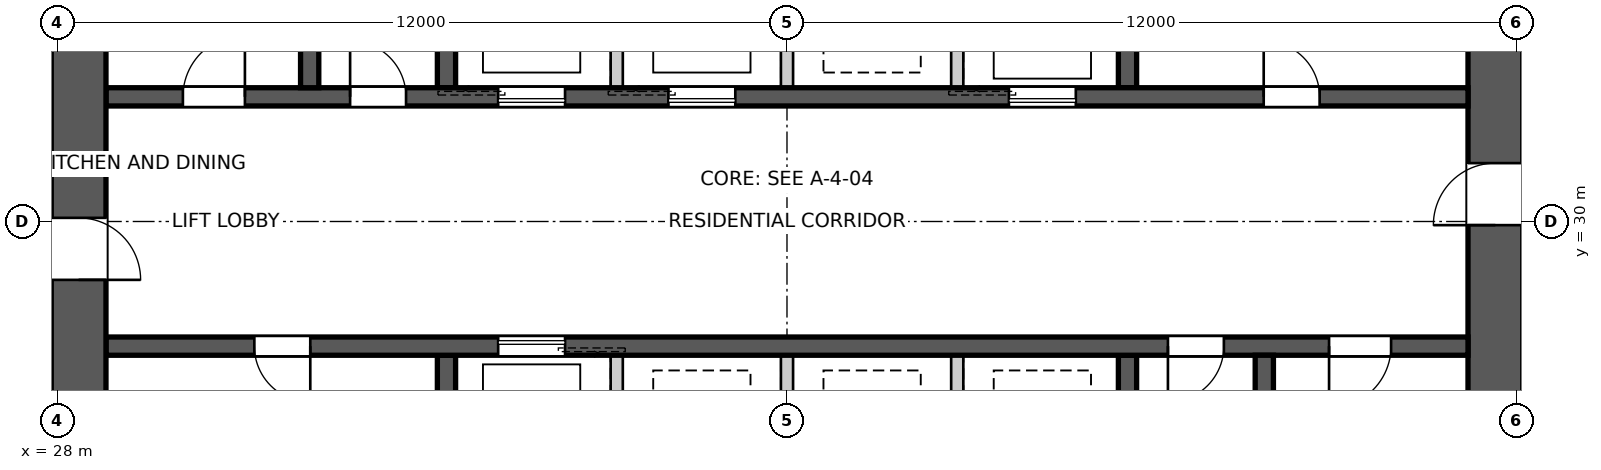
"""IFC4 building model, lengths in metres.
Left out: names, types, materials, properties, quantities, classifications, styles, units other than length and angle.
Written with IfcOpenShell. Run it as: python <this file> out.ifc"""

import sys

from ifc_helpers import new_model, si_unit, direction, frame, frame_2d, origin, place, context, subcontext, project, spatial, polyline, rectangle, outline, extrude, element, fill, save


model = new_model("IFC4")
c1 = context("Model", 3, precision=1e-05, world=origin(), true_north=direction((0.0, 1.0)))
c2 = subcontext(c1, "Body", "Model", "MODEL_VIEW")
j1 = project(units=[si_unit("LENGTHUNIT", "METRE"), si_unit("PLANEANGLEUNIT", "RADIAN")], contexts=[c1])
p1 = place(None, origin())
s1 = spatial("IfcSite", under=j1, at=p1, CompositionType="ELEMENT")
p2 = place(p1, origin())
s2 = spatial("IfcBuilding", under=s1, at=p2, CompositionType="ELEMENT")
p3 = place(p2, frame((0.0, 0.0, 25.2)))
s3 = spatial("IfcBuildingStorey", under=s2, at=p3, CompositionType="ELEMENT", Elevation=25.2)
p4 = place(p3, frame((51.65, 18.8, 0.0), z_axis=(0.0, 0.0, 1.0), x_axis=(0.0, 1.0, 0.0)))
e1 = element("IfcWall", 1, at=p4, inside=s3, PredefinedType="SHEAR", context=c2, shape_type="SweptSolid", body=[
    extrude(outline(polyline([(0.0, -0.45), (22.4, -0.45), (22.4, -0.025), (22.85, -0.025), (22.85, 0.025), (22.4, 0.025), (22.4, 0.45), (0.0, 0.45), (0.0, 0.025), (-0.45, 0.025), (-0.45, -0.025), (0.0, -0.025), (0.0, -0.45)])), origin(), (0.0, 0.0, 1.0), 3.4),
])
p5 = place(p4, frame((11.14, 0.0, 0.0)))
e2 = element("IfcOpeningElement", 2, at=p5, cuts=e1, PredefinedType="OPENING", context=c2, shape_type="SweptSolid", body=[
    extrude(rectangle(XDim=1.02, YDim=2.4, at=frame_2d((0.51, 1.2))), frame((0.0, 0.46, 0.0), z_axis=(0.0, -1.0, 0.0), x_axis=(1.0, 0.0, 0.0)), (0.0, 0.0, 1.0), 0.92),
])
p6 = place(p3, frame((28.35, 41.2, 0.0), z_axis=(0.0, 0.0, 1.0), x_axis=(0.0, -1.0, 0.0)))
e3 = element("IfcWall", 3, at=p6, inside=s3, PredefinedType="SHEAR", context=c2, shape_type="SweptSolid", body=[
    extrude(outline(polyline([(0.0, -0.45), (22.4, -0.45), (22.4, -0.025), (22.85, -0.025), (22.85, 0.025), (22.4, 0.025), (22.4, 0.45), (0.0, 0.45), (0.0, 0.025), (-0.45, 0.025), (-0.45, -0.025), (0.0, -0.025), (0.0, -0.45)])), origin(), (0.0, 0.0, 1.0), 3.4),
])
p7 = place(p6, frame((11.14, 0.0, 0.0)))
e4 = element("IfcOpeningElement", 4, at=p7, cuts=e3, PredefinedType="OPENING", context=c2, shape_type="SweptSolid", body=[
    extrude(rectangle(XDim=1.02, YDim=2.4, at=frame_2d((0.51, 1.2))), frame((0.0, 0.46, 0.0), z_axis=(0.0, -1.0, 0.0), x_axis=(1.0, 0.0, 0.0)), (0.0, 0.0, 1.0), 0.92),
])
p8 = place(p3, frame((28.8, 32.05, 0.0), z_axis=(0.0, 0.0, 1.0), x_axis=(1.0, 0.0, 0.0)))
e5 = element("IfcWall", 5, at=p8, inside=s3, PredefinedType="SHEAR", context=c2, shape_type="SweptSolid", body=[
    extrude(rectangle(XDim=22.4, YDim=0.3, at=frame_2d((11.2, 0.0))), origin(), (0.0, 0.0, 1.0), 3.4),
])
p9 = place(p8, frame((19.04, 0.0, 0.0)))
e6 = element("IfcOpeningElement", 6, at=p9, cuts=e5, PredefinedType="OPENING", context=c2, shape_type="SweptSolid", body=[
    extrude(rectangle(XDim=0.92, YDim=2.1, at=frame_2d((0.46, 1.05))), frame((0.0, 0.16, 0.0), z_axis=(0.0, -1.0, 0.0), x_axis=(1.0, 0.0, 0.0)), (0.0, 0.0, 1.0), 0.32),
])
p10 = place(p8, frame((1.265, 0.0, 0.0)))
e7 = element("IfcOpeningElement", 7, at=p10, cuts=e5, PredefinedType="OPENING", context=c2, shape_type="SweptSolid", body=[
    extrude(rectangle(XDim=1.02, YDim=2.1, at=frame_2d((0.51, 1.05))), frame((0.0, 0.16, 0.0), z_axis=(0.0, -1.0, 0.0), x_axis=(1.0, 0.0, 0.0)), (0.0, 0.0, 1.0), 0.32),
])
p11 = place(p8, frame((4.015, 0.0, 0.0)))
e8 = element("IfcOpeningElement", 8, at=p11, cuts=e5, PredefinedType="OPENING", context=c2, shape_type="SweptSolid", body=[
    extrude(rectangle(XDim=0.92, YDim=2.1, at=frame_2d((0.46, 1.05))), frame((0.0, 0.16, 0.0), z_axis=(0.0, -1.0, 0.0), x_axis=(1.0, 0.0, 0.0)), (0.0, 0.0, 1.0), 0.32),
])
p12 = place(p8, frame((6.45, 0.0, 0.0)))
e9 = element("IfcOpeningElement", 9, at=p12, cuts=e5, PredefinedType="OPENING", context=c2, shape_type="SweptSolid", body=[
    extrude(rectangle(XDim=1.1, YDim=2.1, at=frame_2d((0.55, 1.05))), frame((0.0, 0.16, 0.0), z_axis=(0.0, -1.0, 0.0), x_axis=(1.0, 0.0, 0.0)), (0.0, 0.0, 1.0), 0.32),
])
p13 = place(p8, frame((9.25, 0.0, 0.0)))
e10 = element("IfcOpeningElement", 10, at=p13, cuts=e5, PredefinedType="OPENING", context=c2, shape_type="SweptSolid", body=[
    extrude(rectangle(XDim=1.1, YDim=2.1, at=frame_2d((0.55, 1.05))), frame((0.0, 0.16, 0.0), z_axis=(0.0, -1.0, 0.0), x_axis=(1.0, 0.0, 0.0)), (0.0, 0.0, 1.0), 0.32),
])
p14 = place(p8, frame((14.85, 0.0, 0.0)))
e11 = element("IfcOpeningElement", 11, at=p14, cuts=e5, PredefinedType="OPENING", context=c2, shape_type="SweptSolid", body=[
    extrude(rectangle(XDim=1.1, YDim=2.1, at=frame_2d((0.55, 1.05))), frame((0.0, 0.16, 0.0), z_axis=(0.0, -1.0, 0.0), x_axis=(1.0, 0.0, 0.0)), (0.0, 0.0, 1.0), 0.32),
])
p15 = place(p3, frame((51.2, 27.95, 0.0), z_axis=(0.0, 0.0, 1.0), x_axis=(-1.0, 0.0, 0.0)))
e12 = element("IfcWall", 12, at=p15, inside=s3, PredefinedType="SHEAR", context=c2, shape_type="SweptSolid", body=[
    extrude(rectangle(XDim=22.4, YDim=0.3, at=frame_2d((11.2, 0.0))), origin(), (0.0, 0.0, 1.0), 3.4),
])
p16 = place(p15, frame((19.04, 0.0, 0.0)))
e13 = element("IfcOpeningElement", 13, at=p16, cuts=e12, PredefinedType="OPENING", context=c2, shape_type="SweptSolid", body=[
    extrude(rectangle(XDim=0.92, YDim=2.1, at=frame_2d((0.46, 1.05))), frame((0.0, 0.16, 0.0), z_axis=(0.0, -1.0, 0.0), x_axis=(1.0, 0.0, 0.0)), (0.0, 0.0, 1.0), 0.32),
])
p17 = place(p15, frame((1.265, 0.0, 0.0)))
e14 = element("IfcOpeningElement", 14, at=p17, cuts=e12, PredefinedType="OPENING", context=c2, shape_type="SweptSolid", body=[
    extrude(rectangle(XDim=1.02, YDim=2.1, at=frame_2d((0.51, 1.05))), frame((0.0, 0.16, 0.0), z_axis=(0.0, -1.0, 0.0), x_axis=(1.0, 0.0, 0.0)), (0.0, 0.0, 1.0), 0.32),
])
p18 = place(p15, frame((4.015, 0.0, 0.0)))
e15 = element("IfcOpeningElement", 15, at=p18, cuts=e12, PredefinedType="OPENING", context=c2, shape_type="SweptSolid", body=[
    extrude(rectangle(XDim=0.92, YDim=2.1, at=frame_2d((0.46, 1.05))), frame((0.0, 0.16, 0.0), z_axis=(0.0, -1.0, 0.0), x_axis=(1.0, 0.0, 0.0)), (0.0, 0.0, 1.0), 0.32),
])
p19 = place(p15, frame((14.85, 0.0, 0.0)))
e16 = element("IfcOpeningElement", 16, at=p19, cuts=e12, PredefinedType="OPENING", context=c2, shape_type="SweptSolid", body=[
    extrude(rectangle(XDim=1.1, YDim=2.1, at=frame_2d((0.55, 1.05))), frame((0.0, 0.16, 0.0), z_axis=(0.0, -1.0, 0.0), x_axis=(1.0, 0.0, 0.0)), (0.0, 0.0, 1.0), 0.32),
])
for number, where, z_axis, x_axis in (
    (17, (34.4, 32.2, 0.0), (0.0, 0.0, 1.0), (0.0, 1.0, 0.0)),
    (18, (45.6, 27.8, 0.0), (0.0, 0.0, 1.0), (0.0, -1.0, 0.0)),
):
    element("IfcWall", number, at=place(p3, frame(where, z_axis=z_axis, x_axis=x_axis)), inside=s3, PredefinedType="SHEAR", context=c2, shape_type="SweptSolid", body=[
        extrude(rectangle(XDim=2.8, YDim=0.3, at=frame_2d((1.4, 0.0))), origin(), (0.0, 0.0, 1.0), 3.4),
    ])
for number, where, z_axis, x_axis in (
    (19, (37.2, 32.2, 0.0), (0.0, 0.0, 1.0), (0.0, 1.0, 0.0)),
    (20, (42.8, 27.8, 0.0), (0.0, 0.0, 1.0), (0.0, -1.0, 0.0)),
    (21, (40.0, 32.2, 0.0), (0.0, 0.0, 1.0), (0.0, 1.0, 0.0)),
    (22, (40.0, 27.8, 0.0), (0.0, 0.0, 1.0), (0.0, -1.0, 0.0)),
    (23, (42.8, 32.2, 0.0), (0.0, 0.0, 1.0), (0.0, 1.0, 0.0)),
    (24, (37.2, 27.8, 0.0), (0.0, 0.0, 1.0), (0.0, -1.0, 0.0)),
):
    element("IfcWall", number, at=place(p3, frame(where, z_axis=z_axis, x_axis=x_axis)), inside=s3, PredefinedType="SOLIDWALL", context=c2, shape_type="SweptSolid", body=[
        extrude(rectangle(XDim=2.8, YDim=0.2, at=frame_2d((1.4, 0.0))), origin(), (0.0, 0.0, 1.0), 3.4),
    ])
for number, where, z_axis, x_axis in (
    (25, (45.6, 32.2, 0.0), (0.0, 0.0, 1.0), (0.0, 1.0, 0.0)),
    (26, (34.4, 27.8, 0.0), (0.0, 0.0, 1.0), (0.0, -1.0, 0.0)),
):
    element("IfcWall", number, at=place(p3, frame(where, z_axis=z_axis, x_axis=x_axis)), inside=s3, PredefinedType="SHEAR", context=c2, shape_type="SweptSolid", body=[
        extrude(rectangle(XDim=2.8, YDim=0.3, at=frame_2d((1.4, 0.0))), origin(), (0.0, 0.0, 1.0), 3.4),
    ])
for number, where, z_axis, x_axis in (
    (27, (32.15, 32.2, 0.0), (0.0, 0.0, 1.0), (0.0, 1.0, 0.0)),
    (28, (47.85, 27.8, 0.0), (0.0, 0.0, 1.0), (0.0, -1.0, 0.0)),
):
    element("IfcWall", number, at=place(p3, frame(where, z_axis=z_axis, x_axis=x_axis)), inside=s3, PredefinedType="SHEAR", context=c2, shape_type="SweptSolid", body=[
        extrude(rectangle(XDim=7.7, YDim=0.3, at=frame_2d((3.85, 0.0))), origin(), (0.0, 0.0, 1.0), 3.4),
    ])
p20 = place(p9, origin())
e29 = element("IfcDoor", 29, at=p20, inside=s3, OperationType="SINGLE_SWING_LEFT", PredefinedType="DOOR", context=c2, shape_type="SweptSolid", body=[
    extrude(rectangle(XDim=0.92, YDim=2.1, at=frame_2d((0.46, 1.05))), frame((0.0, 0.025, 0.0), z_axis=(0.0, -1.0, 0.0), x_axis=(1.0, 0.0, 0.0)), (0.0, 0.0, 1.0), 0.05),
])
fill(e6, e29)
p21 = place(p16, origin())
e30 = element("IfcDoor", 30, at=p21, inside=s3, OperationType="SINGLE_SWING_LEFT", PredefinedType="DOOR", context=c2, shape_type="SweptSolid", body=[
    extrude(rectangle(XDim=0.92, YDim=2.1, at=frame_2d((0.46, 1.05))), frame((0.0, 0.025, 0.0), z_axis=(0.0, -1.0, 0.0), x_axis=(1.0, 0.0, 0.0)), (0.0, 0.0, 1.0), 0.05),
])
fill(e13, e30)
p22 = place(p17, origin())
e31 = element("IfcDoor", 31, at=p22, inside=s3, OperationType="SINGLE_SWING_RIGHT", PredefinedType="DOOR", context=c2, shape_type="SweptSolid", body=[
    extrude(rectangle(XDim=1.02, YDim=2.1, at=frame_2d((0.51, 1.05))), frame((0.0, 0.025, 0.0), z_axis=(0.0, -1.0, 0.0), x_axis=(1.0, 0.0, 0.0)), (0.0, 0.0, 1.0), 0.05),
])
fill(e14, e31)
p23 = place(p10, origin())
e32 = element("IfcDoor", 32, at=p23, inside=s3, OperationType="SINGLE_SWING_RIGHT", PredefinedType="DOOR", context=c2, shape_type="SweptSolid", body=[
    extrude(rectangle(XDim=1.02, YDim=2.1, at=frame_2d((0.51, 1.05))), frame((0.0, 0.025, 0.0), z_axis=(0.0, -1.0, 0.0), x_axis=(1.0, 0.0, 0.0)), (0.0, 0.0, 1.0), 0.05),
])
fill(e7, e32)
p24 = place(p11, origin())
e33 = element("IfcDoor", 33, at=p24, inside=s3, OperationType="SINGLE_SWING_LEFT", PredefinedType="DOOR", context=c2, shape_type="SweptSolid", body=[
    extrude(rectangle(XDim=0.92, YDim=2.1, at=frame_2d((0.46, 1.05))), frame((0.0, 0.025, 0.0), z_axis=(0.0, -1.0, 0.0), x_axis=(1.0, 0.0, 0.0)), (0.0, 0.0, 1.0), 0.05),
])
fill(e8, e33)
p25 = place(p18, origin())
e34 = element("IfcDoor", 34, at=p25, inside=s3, OperationType="SINGLE_SWING_RIGHT", PredefinedType="DOOR", context=c2, shape_type="SweptSolid", body=[
    extrude(rectangle(XDim=0.92, YDim=2.1, at=frame_2d((0.46, 1.05))), frame((0.0, 0.025, 0.0), z_axis=(0.0, -1.0, 0.0), x_axis=(1.0, 0.0, 0.0)), (0.0, 0.0, 1.0), 0.05),
])
fill(e15, e34)
p26 = place(p5, origin())
e35 = element("IfcDoor", 35, at=p26, inside=s3, OperationType="SINGLE_SWING_LEFT", PredefinedType="DOOR", context=c2, shape_type="SweptSolid", body=[
    extrude(rectangle(XDim=1.02, YDim=2.4, at=frame_2d((0.51, 1.2))), frame((0.0, 0.025, 0.0), z_axis=(0.0, -1.0, 0.0), x_axis=(1.0, 0.0, 0.0)), (0.0, 0.0, 1.0), 0.05),
])
fill(e2, e35)
p27 = place(p7, origin())
e36 = element("IfcDoor", 36, at=p27, inside=s3, OperationType="SINGLE_SWING_RIGHT", PredefinedType="DOOR", context=c2, shape_type="SweptSolid", body=[
    extrude(rectangle(XDim=1.02, YDim=2.4, at=frame_2d((0.51, 1.2))), frame((0.0, 0.025, 0.0), z_axis=(0.0, -1.0, 0.0), x_axis=(1.0, 0.0, 0.0)), (0.0, 0.0, 1.0), 0.05),
])
fill(e4, e36)
p28 = place(p12, origin())
e37 = element("IfcDoor", 37, at=p28, inside=s3, OperationType="SLIDING_TO_LEFT", PredefinedType="DOOR", context=c2, shape_type="SweptSolid", body=[
    extrude(rectangle(XDim=1.1, YDim=2.1, at=frame_2d((0.55, 1.05))), frame((0.0, 0.025, 0.0), z_axis=(0.0, -1.0, 0.0), x_axis=(1.0, 0.0, 0.0)), (0.0, 0.0, 1.0), 0.05),
])
fill(e9, e37)
p29 = place(p13, origin())
e38 = element("IfcDoor", 38, at=p29, inside=s3, OperationType="SLIDING_TO_LEFT", PredefinedType="DOOR", context=c2, shape_type="SweptSolid", body=[
    extrude(rectangle(XDim=1.1, YDim=2.1, at=frame_2d((0.55, 1.05))), frame((0.0, 0.025, 0.0), z_axis=(0.0, -1.0, 0.0), x_axis=(1.0, 0.0, 0.0)), (0.0, 0.0, 1.0), 0.05),
])
fill(e10, e38)
p30 = place(p14, origin())
e39 = element("IfcDoor", 39, at=p30, inside=s3, OperationType="SLIDING_TO_LEFT", PredefinedType="DOOR", context=c2, shape_type="SweptSolid", body=[
    extrude(rectangle(XDim=1.1, YDim=2.1, at=frame_2d((0.55, 1.05))), frame((0.0, 0.025, 0.0), z_axis=(0.0, -1.0, 0.0), x_axis=(1.0, 0.0, 0.0)), (0.0, 0.0, 1.0), 0.05),
])
fill(e11, e39)
p31 = place(p19, origin())
e40 = element("IfcDoor", 40, at=p31, inside=s3, OperationType="SLIDING_TO_LEFT", PredefinedType="DOOR", context=c2, shape_type="SweptSolid", body=[
    extrude(rectangle(XDim=1.1, YDim=2.1, at=frame_2d((0.55, 1.05))), frame((0.0, 0.025, 0.0), z_axis=(0.0, -1.0, 0.0), x_axis=(1.0, 0.0, 0.0)), (0.0, 0.0, 1.0), 0.05),
])
fill(e16, e40)
save(model, sys.argv[1])
